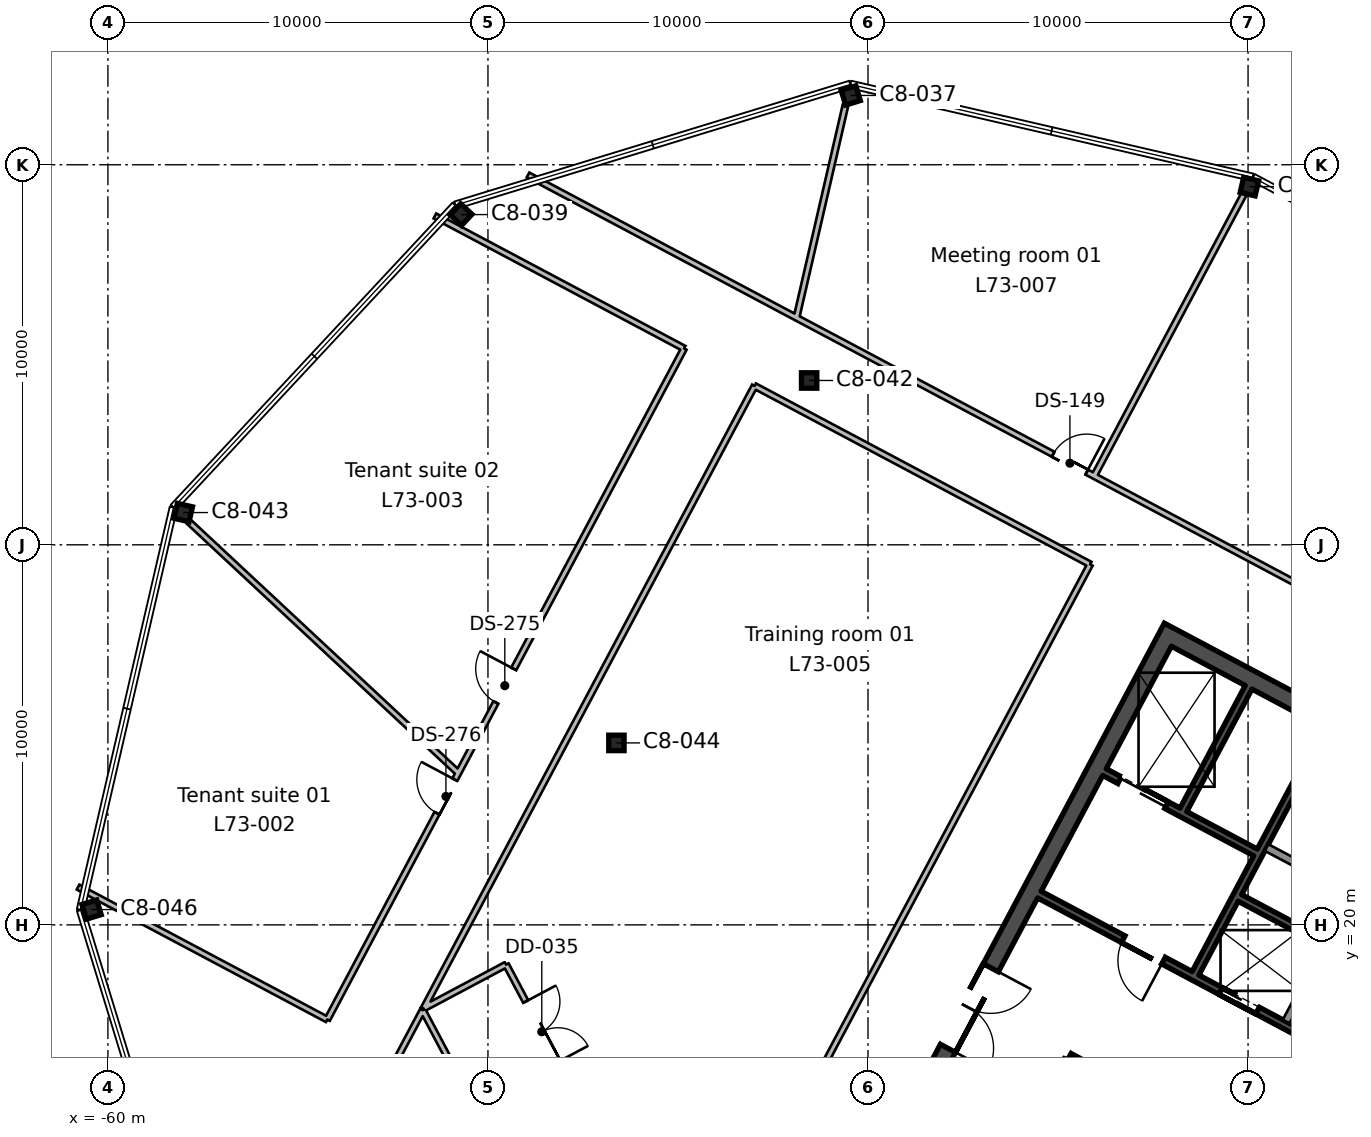
"""IFC4 building model, lengths in metres.
Left out: names, types, materials, properties, quantities, classifications, styles, units other than length and angle.
Written with IfcOpenShell. Run it as: python <this file> out.ifc"""

import sys

from ifc_helpers import new_model, si_unit, direction, frame, frame_2d, origin, origin_2d, place, context, subcontext, project, spatial, rectangle, i_section, extrude, element, fill, save


model = new_model("IFC4")
c1 = context("Model", 3, precision=1e-05, world=origin(), true_north=direction((0.0, 1.0)))
c2 = subcontext(c1, "Body", "Model", "MODEL_VIEW")
j1 = project(units=[si_unit("LENGTHUNIT", "METRE"), si_unit("PLANEANGLEUNIT", "RADIAN")], contexts=[c1])
p1 = place(None, origin())
s1 = spatial("IfcSite", under=j1, at=p1, CompositionType="ELEMENT")
p2 = place(p1, origin())
s2 = spatial("IfcBuilding", under=s1, at=p2, CompositionType="ELEMENT")
p3 = place(p2, frame((0.0, 0.0, 320.4)))
s3 = spatial("IfcBuildingStorey", under=s2, at=p3, CompositionType="ELEMENT", Elevation=320.4)
for number, where, z_axis, x_axis in (
    (1, (-60.43, 20.403, 0.0), (0.0, 0.0, 1.0), (0.292, -0.956, 0.0)),
    (2, (-46.62, 24.788, 0.0), (0.0, 0.0, 1.0), (1.0, 0.0, 0.0)),
    (3, (-58.018, 30.849, 0.0), (0.0, 0.0, 1.0), (-0.225, -0.974, 0.0)),
    (4, (-41.549, 34.324, 0.0), (0.0, 0.0, 1.0), (1.0, 0.0, 0.0)),
    (5, (-50.707, 38.689, 0.0), (0.0, 0.0, 1.0), (-0.682, -0.731, 0.0)),
    (6, (-29.965, 39.425, 0.0), (0.0, 0.0, 1.0), (-0.974, 0.225, 0.0)),
    (7, (-40.455, 41.824, 0.0), (0.0, 0.0, 1.0), (-0.956, -0.292, 0.0)),
):
    element("IfcColumn", number, at=place(p3, frame(where, z_axis=z_axis, x_axis=x_axis)), inside=s3, PredefinedType="COLUMN", context=c2, shape_type="SweptSolid", body=[
        extrude(i_section(OverallWidth=0.404, OverallDepth=0.406, WebThickness=0.027, FlangeThickness=0.044, FilletRadius=0.015, at=origin_2d()), origin(), (0.0, 0.0, 1.0), 3.9),
    ])
p4 = place(p3, frame((-32.004, 27.833, 0.0), z_axis=(0.0, 0.0, 1.0), x_axis=(-0.469467968382, -0.882949504028, 0.0)))
e8 = element("IfcWall", 8, at=p4, inside=s3, PredefinedType="SHEAR", context=c2, shape_type="SweptSolid", body=[
    extrude(rectangle(XDim=19.1, YDim=0.45, at=frame_2d((9.55, 0.0))), origin(), (0.0, 0.0, 1.0), 3.9),
])
p5 = place(p4, frame((10.15, 0.0, 0.0)))
e9 = element("IfcOpeningElement", 9, at=p5, cuts=e8, PredefinedType="OPENING", context=c2, shape_type="SweptSolid", body=[
    extrude(rectangle(XDim=2.4, YDim=2.4, at=frame_2d((1.2, 1.2))), frame((0.0, 0.235, 0.0), z_axis=(0.0, -1.0, 0.0), x_axis=(1.0, 0.0, 0.0)), (0.0, 0.0, 1.0), 0.47),
])
p6 = place(p3, frame((-14.076, 18.045, 0.0), z_axis=(0.0, 0.0, 1.0), x_axis=(-0.882947755831, 0.46947125628, 0.0)))
e10 = element("IfcWall", 10, at=p6, inside=s3, PredefinedType="SHEAR", context=c2, shape_type="SweptSolid", body=[
    extrude(rectangle(XDim=20.2, YDim=0.45, at=frame_2d((10.1, 0.0))), origin(), (0.0, 0.0, 1.0), 3.9),
])
p7 = place(p3, frame((-27.966, 19.4, 0.0), z_axis=(0.0, 0.0, 1.0), x_axis=(-0.4694473164, -0.882960484464, 0.0)))
e11 = element("IfcWall", 11, at=p7, inside=s3, PredefinedType="SOLIDWALL", context=c2, shape_type="SweptSolid", body=[
    extrude(rectangle(XDim=2.2, YDim=0.2, at=frame_2d((1.1, 0.0))), origin(), (0.0, 0.0, 1.0), 3.9),
])
p8 = place(p3, frame((-27.955, 25.171, 0.0), z_axis=(0.0, 0.0, 1.0), x_axis=(-0.469480409012, -0.88294288918, 0.0)))
e12 = element("IfcWall", 12, at=p8, inside=s3, PredefinedType="SHEAR", context=c2, shape_type="SweptSolid", body=[
    extrude(rectangle(XDim=7.3, YDim=0.2, at=frame_2d((3.65, 0.0))), origin(), (0.0, 0.0, 1.0), 3.9),
])
p9 = place(p3, frame((-29.986, 26.25, 0.0), z_axis=(0.0, 0.0, 1.0), x_axis=(-0.469494272526, -0.882935517501, 0.0)))
e13 = element("IfcWall", 13, at=p9, inside=s3, PredefinedType="SHEAR", context=c2, shape_type="SweptSolid", body=[
    extrude(rectangle(XDim=3.65, YDim=0.2, at=frame_2d((1.825, 0.0))), origin(), (0.0, 0.0, 1.0), 3.9),
])
p10 = place(p3, frame((-24.215, 20.917, 0.0), z_axis=(0.0, 0.0, 1.0), x_axis=(-0.882964314875, 0.469440111896, 0.0)))
e14 = element("IfcWall", 14, at=p10, inside=s3, PredefinedType="SOLIDWALL", context=c2, shape_type="SweptSolid", body=[
    extrude(rectangle(XDim=5.2, YDim=0.2, at=frame_2d((2.6, 0.0))), origin(), (0.0, 0.0, 1.0), 3.9),
])
p11 = place(p3, frame((-24.919, 19.592, 0.0), z_axis=(0.0, 0.0, 1.0), x_axis=(-0.882953967957, 0.469459572775, 0.0)))
e15 = element("IfcWall", 15, at=p11, inside=s3, PredefinedType="SOLIDWALL", context=c2, shape_type="SweptSolid", body=[
    extrude(rectangle(XDim=5.2, YDim=0.2, at=frame_2d((2.6, 0.0))), origin(), (0.0, 0.0, 1.0), 3.9),
])
p12 = place(p3, frame((-29.804, 21.906, 0.0), z_axis=(0.0, 0.0, 1.0), x_axis=(-0.882960433586, 0.469447412093, 0.0)))
e16 = element("IfcWall", 16, at=p12, inside=s3, PredefinedType="SHEAR", context=c2, shape_type="SweptSolid", body=[
    extrude(rectangle(XDim=4.5, YDim=0.2, at=frame_2d((2.25, 0.0))), origin(), (0.0, 0.0, 1.0), 3.9),
])
p13 = place(p12, frame((2.65, 0.0, 0.0)))
e17 = element("IfcOpeningElement", 17, at=p13, cuts=e16, PredefinedType="OPENING", context=c2, shape_type="SweptSolid", body=[
    extrude(rectangle(XDim=1.4, YDim=2.4, at=frame_2d((0.7, 1.2))), frame((0.0, 0.11, 0.0), z_axis=(0.0, -1.0, 0.0), x_axis=(1.0, 0.0, 0.0)), (0.0, 0.0, 1.0), 0.22),
])
p14 = place(p3, frame((-25.623, 18.268, 0.0), z_axis=(0.0, 0.0, 1.0), x_axis=(-0.882953967957, 0.469459572775, 0.0)))
e18 = element("IfcWall", 18, at=p14, inside=s3, PredefinedType="SHEAR", context=c2, shape_type="SweptSolid", body=[
    extrude(rectangle(XDim=5.2, YDim=0.2, at=frame_2d((2.6, 0.0))), origin(), (0.0, 0.0, 1.0), 3.9),
])
p15 = place(p3, frame((-26.662, 16.102, 0.0), z_axis=(0.0, 0.0, 1.0), x_axis=(-0.882940221191, 0.469485426614, 0.0)))
e19 = element("IfcWall", 19, at=p15, inside=s3, PredefinedType="SHEAR", context=c2, shape_type="SweptSolid", body=[
    extrude(rectangle(XDim=10.0, YDim=0.2, at=frame_2d((5.0, 0.0))), origin(), (0.0, 0.0, 1.0), 3.9),
])
p16 = place(p15, frame((6.3, 0.0, 0.0)))
e20 = element("IfcOpeningElement", 20, at=p16, cuts=e19, PredefinedType="OPENING", context=c2, shape_type="SweptSolid", body=[
    extrude(rectangle(XDim=1.2, YDim=2.1, at=frame_2d((0.6, 1.05))), frame((0.0, 0.11, 0.0), z_axis=(0.0, -1.0, 0.0), x_axis=(1.0, 0.0, 0.0)), (0.0, 0.0, 1.0), 0.22),
])
p17 = place(p15, frame((0.8, 0.0, 0.0)))
e21 = element("IfcOpeningElement", 21, at=p17, cuts=e19, PredefinedType="OPENING", context=c2, shape_type="SweptSolid", body=[
    extrude(rectangle(XDim=1.1, YDim=2.1, at=frame_2d((0.55, 1.05))), frame((0.0, 0.11, 0.0), z_axis=(0.0, -1.0, 0.0), x_axis=(1.0, 0.0, 0.0)), (0.0, 0.0, 1.0), 0.22),
])
p18 = place(p15, frame((3.5, 0.0, 0.0)))
e22 = element("IfcOpeningElement", 22, at=p18, cuts=e19, PredefinedType="OPENING", context=c2, shape_type="SweptSolid", body=[
    extrude(rectangle(XDim=1.1, YDim=2.1, at=frame_2d((0.55, 1.05))), frame((0.0, 0.11, 0.0), z_axis=(0.0, -1.0, 0.0), x_axis=(1.0, 0.0, 0.0)), (0.0, 0.0, 1.0), 0.22),
])
p19 = place(p3, frame((-29.935, 13.991, 0.0), z_axis=(0.0, 0.0, 1.0), x_axis=(-0.882952937579, 0.469461510692, 0.0)))
e23 = element("IfcWall", 23, at=p19, inside=s3, PredefinedType="SHEAR", context=c2, shape_type="SweptSolid", body=[
    extrude(rectangle(XDim=5.4, YDim=0.2, at=frame_2d((2.7, 0.0))), origin(), (0.0, 0.0, 1.0), 3.9),
])
p20 = place(p19, frame((0.36, 0.0, 0.0)))
e24 = element("IfcOpeningElement", 24, at=p20, cuts=e23, PredefinedType="OPENING", context=c2, shape_type="SweptSolid", body=[
    extrude(rectangle(XDim=0.9, YDim=2.1, at=frame_2d((0.45, 1.05))), frame((0.0, 0.11, 0.0), z_axis=(0.0, -1.0, 0.0), x_axis=(1.0, 0.0, 0.0)), (0.0, 0.0, 1.0), 0.22),
])
p21 = place(p19, frame((3.06, 0.0, 0.0)))
e25 = element("IfcOpeningElement", 25, at=p21, cuts=e23, PredefinedType="OPENING", context=c2, shape_type="SweptSolid", body=[
    extrude(rectangle(XDim=0.9, YDim=2.1, at=frame_2d((0.45, 1.05))), frame((0.0, 0.11, 0.0), z_axis=(0.0, -1.0, 0.0), x_axis=(1.0, 0.0, 0.0)), (0.0, 0.0, 1.0), 0.22),
])
p22 = place(p3, frame((-54.228, 17.508, 0.0), z_axis=(0.0, 0.0, 1.0), x_axis=(0.469451816494, 0.882958091865, 0.0)))
e26 = element("IfcWall", 26, at=p22, inside=s3, PredefinedType="PARTITIONING", context=c2, shape_type="SweptSolid", body=[
    extrude(rectangle(XDim=20.0, YDim=0.15, at=frame_2d((10.0, 0.0))), origin(), (0.0, 0.0, 1.0), 3.54),
])
p23 = place(p22, frame((9.45, 0.0, 0.0)))
e27 = element("IfcOpeningElement", 27, at=p23, cuts=e26, PredefinedType="OPENING", context=c2, shape_type="SweptSolid", body=[
    extrude(rectangle(XDim=1.0, YDim=2.1, at=frame_2d((0.5, 1.05))), frame((0.0, 0.085, 0.0), z_axis=(0.0, -1.0, 0.0), x_axis=(1.0, 0.0, 0.0)), (0.0, 0.0, 1.0), 0.17),
])
p24 = place(p22, frame((6.15, 0.0, 0.0)))
e28 = element("IfcOpeningElement", 28, at=p24, cuts=e26, PredefinedType="OPENING", context=c2, shape_type="SweptSolid", body=[
    extrude(rectangle(XDim=1.0, YDim=2.1, at=frame_2d((0.5, 1.05))), frame((0.0, 0.085, 0.0), z_axis=(0.0, -1.0, 0.0), x_axis=(1.0, 0.0, 0.0)), (0.0, 0.0, 1.0), 0.17),
])
p25 = place(p3, frame((-44.839, 35.167, 0.0), z_axis=(0.0, 0.0, 1.0), x_axis=(-0.882991834211, 0.469388347444, 0.0)))
e29 = element("IfcWall", 29, at=p25, inside=s3, PredefinedType="PARTITIONING", context=c2, shape_type="SweptSolid", body=[
    extrude(rectangle(XDim=7.427, YDim=0.15, at=frame_2d((3.713, 0.0))), origin(), (0.0, 0.0, 1.0), 3.54),
])
p26 = place(p3, frame((-57.872, 30.608, 0.0), z_axis=(0.0, 0.0, 1.0), x_axis=(0.731433570758, -0.681912700841, 0.0)))
e30 = element("IfcWall", 30, at=p26, inside=s3, PredefinedType="PARTITIONING", context=c2, shape_type="SweptSolid", body=[
    extrude(rectangle(XDim=9.698, YDim=0.15, at=frame_2d((4.849, 0.0))), origin(), (0.0, 0.0, 1.0), 3.54),
])
p27 = place(p3, frame((-54.228, 17.508, 0.0), z_axis=(0.0, 0.0, 1.0), x_axis=(-0.882937333257, 0.469490857783, 0.0)))
e31 = element("IfcWall", 31, at=p27, inside=s3, PredefinedType="PARTITIONING", context=c2, shape_type="SweptSolid", body=[
    extrude(rectangle(XDim=7.427, YDim=0.15, at=frame_2d((3.714, 0.0))), origin(), (0.0, 0.0, 1.0), 3.54),
])
p28 = place(p3, frame((-48.947, 39.73, 0.0), z_axis=(0.0, 0.0, 1.0), x_axis=(0.882945454821, -0.469475583828, 0.0)))
e32 = element("IfcWall", 32, at=p28, inside=s3, PredefinedType="PARTITIONING", context=c2, shape_type="SweptSolid", body=[
    extrude(rectangle(XDim=55.436, YDim=0.15, at=frame_2d((27.718, 0.0))), origin(), (0.0, 0.0, 1.0), 3.54),
])
p29 = place(p28, frame((28.35, 0.0, 0.0)))
e33 = element("IfcOpeningElement", 33, at=p29, cuts=e32, PredefinedType="OPENING", context=c2, shape_type="SweptSolid", body=[
    extrude(rectangle(XDim=1.8, YDim=2.1, at=frame_2d((0.9, 1.05))), frame((0.0, 0.085, 0.0), z_axis=(0.0, -1.0, 0.0), x_axis=(1.0, 0.0, 0.0)), (0.0, 0.0, 1.0), 0.17),
])
p30 = place(p28, frame((26.7, 0.0, 0.0)))
e34 = element("IfcOpeningElement", 34, at=p30, cuts=e32, PredefinedType="OPENING", context=c2, shape_type="SweptSolid", body=[
    extrude(rectangle(XDim=1.0, YDim=2.1, at=frame_2d((0.5, 1.05))), frame((0.0, 0.085, 0.0), z_axis=(0.0, -1.0, 0.0), x_axis=(1.0, 0.0, 0.0)), (0.0, 0.0, 1.0), 0.17),
])
p31 = place(p28, frame((15.65, 0.0, 0.0)))
e35 = element("IfcOpeningElement", 35, at=p31, cuts=e32, PredefinedType="OPENING", context=c2, shape_type="SweptSolid", body=[
    extrude(rectangle(XDim=1.0, YDim=2.1, at=frame_2d((0.5, 1.05))), frame((0.0, 0.085, 0.0), z_axis=(0.0, -1.0, 0.0), x_axis=(1.0, 0.0, 0.0)), (0.0, 0.0, 1.0), 0.17),
])
p32 = place(p3, frame((-47.621, 15.378, 0.0), z_axis=(0.0, 0.0, 1.0), x_axis=(-0.469542997944, 0.882909606404, 0.0)))
e36 = element("IfcWall", 36, at=p32, inside=s3, PredefinedType="PARTITIONING", context=c2, shape_type="SweptSolid", body=[
    extrude(rectangle(XDim=4.051, YDim=0.15, at=frame_2d((2.025, 0.0))), origin(), (0.0, 0.0, 1.0), 3.54),
])
p33 = place(p32, frame((1.15, 0.0, 0.0)))
e37 = element("IfcOpeningElement", 37, at=p33, cuts=e36, PredefinedType="OPENING", context=c2, shape_type="SweptSolid", body=[
    extrude(rectangle(XDim=1.8, YDim=2.1, at=frame_2d((0.9, 1.05))), frame((0.0, 0.085, 0.0), z_axis=(0.0, -1.0, 0.0), x_axis=(1.0, 0.0, 0.0)), (0.0, 0.0, 1.0), 0.17),
])
p34 = place(p3, frame((-49.523, 18.954, 0.0), z_axis=(0.0, 0.0, 1.0), x_axis=(-0.882767334528, -0.469810422501, 0.0)))
e38 = element("IfcWall", 38, at=p34, inside=s3, PredefinedType="PARTITIONING", context=c2, shape_type="SweptSolid", body=[
    extrude(rectangle(XDim=2.461, YDim=0.15, at=frame_2d((1.23, 0.0))), origin(), (0.0, 0.0, 1.0), 3.54),
])
p35 = place(p3, frame((-51.695, 17.798, 0.0), z_axis=(0.0, 0.0, 1.0), x_axis=(0.469483567396, 0.88294120979, 0.0)))
e39 = element("IfcWall", 39, at=p35, inside=s3, PredefinedType="PARTITIONING", context=c2, shape_type="SweptSolid", body=[
    extrude(rectangle(XDim=18.555, YDim=0.15, at=frame_2d((9.277, 0.0))), origin(), (0.0, 0.0, 1.0), 3.54),
])
p36 = place(p3, frame((-42.984, 34.181, 0.0), z_axis=(0.0, 0.0, 1.0), x_axis=(0.882929457898, -0.469505668097, 0.0)))
e40 = element("IfcWall", 40, at=p36, inside=s3, PredefinedType="PARTITIONING", context=c2, shape_type="SweptSolid", body=[
    extrude(rectangle(XDim=10.0, YDim=0.15, at=frame_2d((5.0, 0.0))), origin(), (0.0, 0.0, 1.0), 3.54),
])
p37 = place(p3, frame((-34.155, 29.486, 0.0), z_axis=(0.0, 0.0, 1.0), x_axis=(-0.469446756585, -0.882960782103, 0.0)))
e41 = element("IfcWall", 41, at=p37, inside=s3, PredefinedType="PARTITIONING", context=c2, shape_type="SweptSolid", body=[
    extrude(rectangle(XDim=20.0, YDim=0.15, at=frame_2d((10.0, 0.0))), origin(), (0.0, 0.0, 1.0), 3.54),
])
p38 = place(p3, frame((-30.098, 39.247, 0.0), z_axis=(0.0, 0.0, 1.0), x_axis=(-0.469450486213, -0.882958799149, 0.0)))
e42 = element("IfcWall", 42, at=p38, inside=s3, PredefinedType="PARTITIONING", context=c2, shape_type="SweptSolid", body=[
    extrude(rectangle(XDim=8.423, YDim=0.15, at=frame_2d((4.211, 0.0))), origin(), (0.0, 0.0, 1.0), 3.54),
])
p39 = place(p3, frame((-41.883, 35.974, 0.0), z_axis=(0.0, 0.0, 1.0), x_axis=(0.22493705502, 0.974373296678, 0.0)))
e43 = element("IfcWall", 43, at=p39, inside=s3, PredefinedType="PARTITIONING", context=c2, shape_type="SweptSolid", body=[
    extrude(rectangle(XDim=5.748, YDim=0.15, at=frame_2d((2.874, 0.0))), origin(), (0.0, 0.0, 1.0), 3.54),
])
p40 = place(p3, frame((-52.374, 16.522, 0.0), z_axis=(0.0, 0.0, 1.0), x_axis=(0.882981472085, -0.469407839682, 0.0)))
e44 = element("IfcWall", 44, at=p40, inside=s3, PredefinedType="PARTITIONING", context=c2, shape_type="SweptSolid", body=[
    extrude(rectangle(XDim=2.073, YDim=0.15, at=frame_2d((1.036, 0.0))), origin(), (0.0, 0.0, 1.0), 3.54),
])
p41 = place(p3, frame((-50.544, 15.549, 0.0), z_axis=(0.0, 0.0, 1.0), x_axis=(-0.469183782948, 0.883100547967, 0.0)))
e45 = element("IfcWall", 45, at=p41, inside=s3, PredefinedType="PARTITIONING", context=c2, shape_type="SweptSolid", body=[
    extrude(rectangle(XDim=2.5, YDim=0.15, at=frame_2d((1.25, 0.0))), origin(), (0.0, 0.0, 1.0), 3.54),
])
p42 = place(p3, frame((-51.717, 17.757, 0.0), z_axis=(0.0, 0.0, 1.0), x_axis=(-0.469618761384, -0.882869310236, 0.0)))
e46 = element("IfcWall", 46, at=p42, inside=s3, PredefinedType="PARTITIONING", context=c2, shape_type="SweptSolid", body=[
    extrude(rectangle(XDim=1.399, YDim=0.15, at=frame_2d((0.699, 0.0))), origin(), (0.0, 0.0, 1.0), 3.54),
])
p43 = place(p5, origin())
e47 = element("IfcDoor", 47, at=p43, inside=s3, OperationType="DOUBLE_DOOR_SINGLE_SWING", PredefinedType="DOOR", context=c2, shape_type="SweptSolid", body=[
    extrude(rectangle(XDim=2.4, YDim=2.4, at=frame_2d((1.2, 1.2))), frame((0.0, 0.025, 0.0), z_axis=(0.0, -1.0, 0.0), x_axis=(1.0, 0.0, 0.0)), (0.0, 0.0, 1.0), 0.05),
])
fill(e9, e47)
p44 = place(p16, origin())
e48 = element("IfcDoor", 48, at=p44, inside=s3, OperationType="SINGLE_SWING_LEFT", PredefinedType="DOOR", context=c2, shape_type="SweptSolid", body=[
    extrude(rectangle(XDim=1.2, YDim=2.1, at=frame_2d((0.6, 1.05))), frame((0.0, 0.025, 0.0), z_axis=(0.0, -1.0, 0.0), x_axis=(1.0, 0.0, 0.0)), (0.0, 0.0, 1.0), 0.05),
])
fill(e20, e48)
p45 = place(p18, origin())
e49 = element("IfcDoor", 49, at=p45, inside=s3, OperationType="DOUBLE_DOOR_SLIDING", PredefinedType="DOOR", context=c2, shape_type="SweptSolid", body=[
    extrude(rectangle(XDim=1.1, YDim=2.1, at=frame_2d((0.55, 1.05))), frame((0.0, 0.025, 0.0), z_axis=(0.0, -1.0, 0.0), x_axis=(1.0, 0.0, 0.0)), (0.0, 0.0, 1.0), 0.05),
])
fill(e22, e49)
p46 = place(p13, origin())
e50 = element("IfcDoor", 50, at=p46, inside=s3, OperationType="DOUBLE_DOOR_SLIDING", PredefinedType="DOOR", context=c2, shape_type="SweptSolid", body=[
    extrude(rectangle(XDim=1.4, YDim=2.4, at=frame_2d((0.7, 1.2))), frame((0.0, 0.025, 0.0), z_axis=(0.0, -1.0, 0.0), x_axis=(1.0, 0.0, 0.0)), (0.0, 0.0, 1.0), 0.05),
])
fill(e17, e50)
p47 = place(p23, origin())
e51 = element("IfcDoor", 51, at=p47, inside=s3, OperationType="SINGLE_SWING_RIGHT", PredefinedType="DOOR", context=c2, shape_type="SweptSolid", body=[
    extrude(rectangle(XDim=1.0, YDim=2.1, at=frame_2d((0.5, 1.05))), frame((0.0, 0.025, 0.0), z_axis=(0.0, -1.0, 0.0), x_axis=(1.0, 0.0, 0.0)), (0.0, 0.0, 1.0), 0.05),
])
fill(e27, e51)
p48 = place(p24, origin())
e52 = element("IfcDoor", 52, at=p48, inside=s3, OperationType="SINGLE_SWING_RIGHT", PredefinedType="DOOR", context=c2, shape_type="SweptSolid", body=[
    extrude(rectangle(XDim=1.0, YDim=2.1, at=frame_2d((0.5, 1.05))), frame((0.0, 0.025, 0.0), z_axis=(0.0, -1.0, 0.0), x_axis=(1.0, 0.0, 0.0)), (0.0, 0.0, 1.0), 0.05),
])
fill(e28, e52)
p49 = place(p33, frame((1.8, 0.0, 0.0), z_axis=(0.0, 0.0, 1.0), x_axis=(-1.0, 0.0, 0.0)))
e53 = element("IfcDoor", 53, at=p49, inside=s3, OperationType="DOUBLE_DOOR_SINGLE_SWING", PredefinedType="DOOR", context=c2, shape_type="SweptSolid", body=[
    extrude(rectangle(XDim=1.8, YDim=2.1, at=frame_2d((0.9, 1.05))), frame((0.0, 0.025, 0.0), z_axis=(0.0, -1.0, 0.0), x_axis=(1.0, 0.0, 0.0)), (0.0, 0.0, 1.0), 0.05),
])
fill(e37, e53)
p50 = place(p31, origin())
e54 = element("IfcDoor", 54, at=p50, inside=s3, OperationType="SINGLE_SWING_RIGHT", PredefinedType="DOOR", context=c2, shape_type="SweptSolid", body=[
    extrude(rectangle(XDim=1.0, YDim=2.1, at=frame_2d((0.5, 1.05))), frame((0.0, 0.025, 0.0), z_axis=(0.0, -1.0, 0.0), x_axis=(1.0, 0.0, 0.0)), (0.0, 0.0, 1.0), 0.05),
])
fill(e35, e54)
save(model, sys.argv[1])
